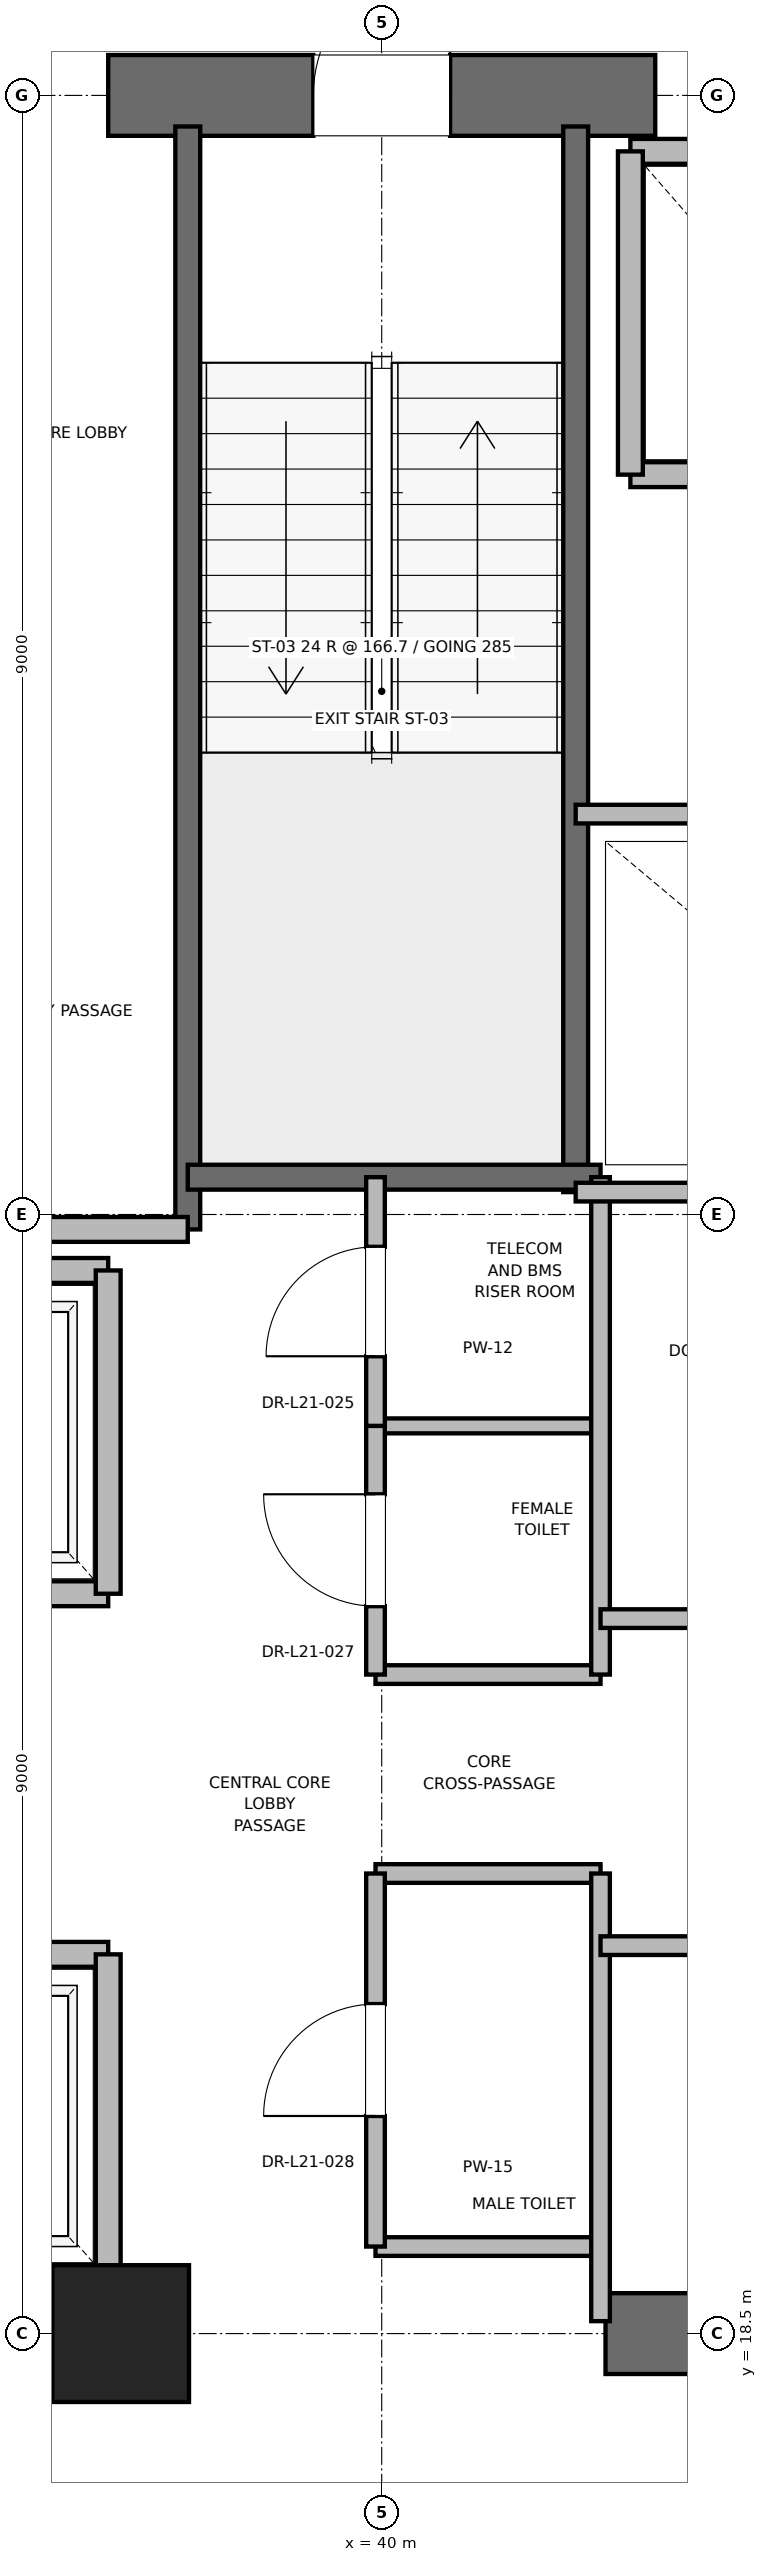
"""IFC4 building model, lengths in metres.
Left out: names, types, materials, properties, quantities, classifications, styles, units other than length and angle.
Written with IfcOpenShell. Run it as: python <this file> out.ifc"""

import sys

from ifc_helpers import new_model, si_unit, direction, frame, frame_2d, origin, origin_2d, place, context, subcontext, project, spatial, rectangle, extrude, element, fill, save


model = new_model("IFC4")
c1 = context("Model", 3, precision=1e-05, world=origin(), true_north=direction((0.0, 1.0)))
c2 = subcontext(c1, "Body", "Model", "MODEL_VIEW")
j1 = project(units=[si_unit("LENGTHUNIT", "METRE"), si_unit("PLANEANGLEUNIT", "RADIAN")], contexts=[c1])
p1 = place(None, origin())
s1 = spatial("IfcSite", under=j1, at=p1, CompositionType="ELEMENT")
p2 = place(p1, origin())
s2 = spatial("IfcBuilding", under=s1, at=p2, CompositionType="ELEMENT")
p3 = place(p2, frame((0.0, 0.0, 91.6)))
s3 = spatial("IfcBuildingStorey", under=s2, at=p3, CompositionType="ELEMENT", Elevation=91.6)
p4 = place(p3, frame((37.9, 18.5, 0.0), z_axis=(0.0, 0.0, 1.0), x_axis=(1.0, 0.0, 0.0)))
e1 = element("IfcColumn", 1, at=p4, inside=s3, PredefinedType="PILASTER", context=c2, shape_type="SweptSolid", body=[
    extrude(rectangle(XDim=1.1, YDim=1.1, at=origin_2d()), origin(), (0.0, 0.0, 1.0), 4.0),
])
for number, where, z_axis, x_axis in (
    (2, (29.0, 18.5, 0.0), (0.0, 0.0, 1.0), (1.0, 0.0, 0.0)),
    (3, (41.8, 18.5, 0.0), (0.0, 0.0, 1.0), (1.0, 0.0, 0.0)),
):
    element("IfcWall", number, at=place(p3, frame(where, z_axis=z_axis, x_axis=x_axis)), inside=s3, PredefinedType="SHEAR", context=c2, shape_type="SweptSolid", body=[
        extrude(rectangle(XDim=9.2, YDim=0.65, at=frame_2d((4.6, 0.0))), origin(), (0.0, 0.0, 1.0), 3.76),
    ])
p5 = place(p3, frame((37.8, 36.5, 0.0), z_axis=(0.0, 0.0, 1.0), x_axis=(1.0, 0.0, 0.0)))
e4 = element("IfcWall", 4, at=p5, inside=s3, PredefinedType="SHEAR", context=c2, shape_type="SweptSolid", body=[
    extrude(rectangle(XDim=4.4, YDim=0.65, at=frame_2d((2.2, 0.0))), origin(), (0.0, 0.0, 1.0), 3.76),
])
p6 = place(p5, frame((1.65, 0.0, 0.0)))
e5 = element("IfcOpeningElement", 5, at=p6, cuts=e4, PredefinedType="OPENING", context=c2, shape_type="SweptSolid", body=[
    extrude(rectangle(XDim=1.1, YDim=2.15, at=frame_2d((0.55, 1.075))), frame((0.0, 0.325, 0.0), z_axis=(0.0, -1.0, 0.0), x_axis=(1.0, 0.0, 0.0)), (0.0, 0.0, 1.0), 0.65),
])
p7 = place(p3, frame((38.44, 27.38, 0.0), z_axis=(0.0, 0.0, 1.0), x_axis=(0.0, 1.0, 0.0)))
e6 = element("IfcWall", 6, at=p7, inside=s3, PredefinedType="SOLIDWALL", context=c2, shape_type="SweptSolid", body=[
    extrude(rectangle(XDim=8.87, YDim=0.2, at=frame_2d((4.435, 0.0))), origin(), (0.0, 0.0, 1.0), 3.76),
])
p8 = place(p3, frame((41.56, 27.68, 0.0), z_axis=(0.0, 0.0, 1.0), x_axis=(0.0, 1.0, 0.0)))
e7 = element("IfcWall", 7, at=p8, inside=s3, PredefinedType="SOLIDWALL", context=c2, shape_type="SweptSolid", body=[
    extrude(rectangle(XDim=8.57, YDim=0.2, at=frame_2d((4.285, 0.0))), origin(), (0.0, 0.0, 1.0), 3.76),
])
p9 = place(p3, frame((38.44, 27.8, 0.0), z_axis=(0.0, 0.0, 1.0), x_axis=(1.0, 0.0, 0.0)))
e8 = element("IfcWall", 8, at=p9, inside=s3, PredefinedType="SOLIDWALL", context=c2, shape_type="SweptSolid", body=[
    extrude(rectangle(XDim=3.32, YDim=0.2, at=frame_2d((1.66, 0.0))), origin(), (0.0, 0.0, 1.0), 3.76),
])
p10 = place(p3, frame((32.82, 27.38, 0.0), z_axis=(0.0, 0.0, 1.0), x_axis=(1.0, 0.0, 0.0)))
e9 = element("IfcWall", 9, at=p10, inside=s3, PredefinedType="PARTITIONING", context=c2, shape_type="SweptSolid", body=[
    extrude(rectangle(XDim=5.62, YDim=0.2, at=frame_2d((2.81, 0.0))), origin(), (0.0, 0.0, 1.0), 3.76),
])
p11 = place(p3, frame((35.5, 18.95, 0.0), z_axis=(0.0, 0.0, 1.0), x_axis=(1.0, 0.0, 0.0)))
e10 = element("IfcWall", 10, at=p11, inside=s3, PredefinedType="SOLIDWALL", context=c2, shape_type="SweptSolid", body=[
    extrude(rectangle(XDim=2.3, YDim=0.2, at=frame_2d((1.15, 0.0))), origin(), (0.0, 0.0, 1.0), 2.54),
])
p12 = place(p3, frame((37.8, 21.55, 0.0), z_axis=(0.0, 0.0, 1.0), x_axis=(-1.0, 0.0, 0.0)))
e11 = element("IfcWall", 11, at=p12, inside=s3, PredefinedType="SOLIDWALL", context=c2, shape_type="SweptSolid", body=[
    extrude(rectangle(XDim=2.3, YDim=0.2, at=frame_2d((1.15, 0.0))), origin(), (0.0, 0.0, 1.0), 3.76),
])
p13 = place(p12, frame((0.6, 0.0, 0.0)))
e12 = element("IfcOpeningElement", 12, at=p13, cuts=e11, PredefinedType="OPENING", context=c2, shape_type="SweptSolid", body=[
    extrude(rectangle(XDim=1.1, YDim=2.2, at=frame_2d((0.55, 1.1))), frame((0.0, 0.1, 0.0), z_axis=(0.0, -1.0, 0.0), x_axis=(1.0, 0.0, 0.0)), (0.0, 0.0, 1.0), 0.2),
])
p14 = place(p3, frame((37.8, 18.95, 0.0), z_axis=(0.0, 0.0, 1.0), x_axis=(0.0, 1.0, 0.0)))
e13 = element("IfcWall", 13, at=p14, inside=s3, PredefinedType="SOLIDWALL", context=c2, shape_type="SweptSolid", body=[
    extrude(rectangle(XDim=2.6, YDim=0.2, at=frame_2d((1.3, 0.0))), origin(), (0.0, 0.0, 1.0), 2.54),
])
p15 = place(p3, frame((35.5, 24.45, 0.0), z_axis=(0.0, 0.0, 1.0), x_axis=(1.0, 0.0, 0.0)))
e14 = element("IfcWall", 14, at=p15, inside=s3, PredefinedType="SOLIDWALL", context=c2, shape_type="SweptSolid", body=[
    extrude(rectangle(XDim=2.3, YDim=0.2, at=frame_2d((1.15, 0.0))), origin(), (0.0, 0.0, 1.0), 3.76),
])
p16 = place(p15, frame((0.6, 0.0, 0.0)))
e15 = element("IfcOpeningElement", 15, at=p16, cuts=e14, PredefinedType="OPENING", context=c2, shape_type="SweptSolid", body=[
    extrude(rectangle(XDim=1.1, YDim=2.2, at=frame_2d((0.55, 1.1))), frame((0.0, 0.1, 0.0), z_axis=(0.0, -1.0, 0.0), x_axis=(1.0, 0.0, 0.0)), (0.0, 0.0, 1.0), 0.2),
])
p17 = place(p3, frame((37.8, 27.05, 0.0), z_axis=(0.0, 0.0, 1.0), x_axis=(-1.0, 0.0, 0.0)))
e16 = element("IfcWall", 16, at=p17, inside=s3, PredefinedType="SOLIDWALL", context=c2, shape_type="SweptSolid", body=[
    extrude(rectangle(XDim=2.3, YDim=0.2, at=frame_2d((1.15, 0.0))), origin(), (0.0, 0.0, 1.0), 3.76),
])
p18 = place(p3, frame((37.8, 24.45, 0.0), z_axis=(0.0, 0.0, 1.0), x_axis=(0.0, 1.0, 0.0)))
e17 = element("IfcWall", 17, at=p18, inside=s3, PredefinedType="SOLIDWALL", context=c2, shape_type="SweptSolid", body=[
    extrude(rectangle(XDim=2.6, YDim=0.2, at=frame_2d((1.3, 0.0))), origin(), (0.0, 0.0, 1.0), 3.76),
])
p19 = place(p3, frame((42.0, 33.45, 0.0), z_axis=(0.0, 0.0, 1.0), x_axis=(1.0, 0.0, 0.0)))
e18 = element("IfcWall", 18, at=p19, inside=s3, PredefinedType="SOLIDWALL", context=c2, shape_type="SweptSolid", body=[
    extrude(rectangle(XDim=2.3, YDim=0.2, at=frame_2d((1.15, 0.0))), origin(), (0.0, 0.0, 1.0), 3.76),
])
p20 = place(p3, frame((44.3, 36.05, 0.0), z_axis=(0.0, 0.0, 1.0), x_axis=(-1.0, 0.0, 0.0)))
e19 = element("IfcWall", 19, at=p20, inside=s3, PredefinedType="SOLIDWALL", context=c2, shape_type="SweptSolid", body=[
    extrude(rectangle(XDim=2.3, YDim=0.2, at=frame_2d((1.15, 0.0))), origin(), (0.0, 0.0, 1.0), 2.54),
])
p21 = place(p3, frame((42.0, 36.05, 0.0), z_axis=(0.0, 0.0, 1.0), x_axis=(0.0, -1.0, 0.0)))
e20 = element("IfcWall", 20, at=p21, inside=s3, PredefinedType="SOLIDWALL", context=c2, shape_type="SweptSolid", body=[
    extrude(rectangle(XDim=2.6, YDim=0.2, at=frame_2d((1.3, 0.0))), origin(), (0.0, 0.0, 1.0), 2.54),
])
for number, where, z_axis, x_axis in (
    (21, (39.95, 19.2, 0.0), (0.0, 0.0, 1.0), (1.0, 0.0, 0.0)),
    (22, (39.95, 22.2, 0.0), (0.0, 0.0, 1.0), (1.0, 0.0, 0.0)),
    (23, (39.95, 23.8, 0.0), (0.0, 0.0, 1.0), (1.0, 0.0, 0.0)),
):
    element("IfcWall", number, at=place(p3, frame(where, z_axis=z_axis, x_axis=x_axis)), inside=s3, PredefinedType="PARTITIONING", context=c2, shape_type="SweptSolid", body=[
        extrude(rectangle(XDim=1.81, YDim=0.15, at=frame_2d((0.905, 0.0))), origin(), (0.0, 0.0, 1.0), 2.85),
    ])
p22 = place(p3, frame((39.95, 25.8, 0.0), z_axis=(0.0, 0.0, 1.0), x_axis=(1.0, 0.0, 0.0)))
e24 = element("IfcWall", 24, at=p22, inside=s3, PredefinedType="PARTITIONING", context=c2, shape_type="SweptSolid", body=[
    extrude(rectangle(XDim=1.81, YDim=0.12, at=frame_2d((0.905, 0.0))), origin(), (0.0, 0.0, 1.0), 2.85),
])
p23 = place(p3, frame((41.76, 18.6, 0.0), z_axis=(0.0, 0.0, 1.0), x_axis=(0.0, 1.0, 0.0)))
e25 = element("IfcWall", 25, at=p23, inside=s3, PredefinedType="PARTITIONING", context=c2, shape_type="SweptSolid", body=[
    extrude(rectangle(XDim=3.6, YDim=0.15, at=frame_2d((1.8, 0.0))), origin(), (0.0, 0.0, 1.0), 2.54),
])
p24 = place(p3, frame((41.76, 23.8, 0.0), z_axis=(0.0, 0.0, 1.0), x_axis=(0.0, 1.0, 0.0)))
e26 = element("IfcWall", 26, at=p24, inside=s3, PredefinedType="PARTITIONING", context=c2, shape_type="SweptSolid", body=[
    extrude(rectangle(XDim=4.0, YDim=0.15, at=frame_2d((2.0, 0.0))), origin(), (0.0, 0.0, 1.0), 2.85),
])
p25 = place(p3, frame((39.95, 19.2, 0.0), z_axis=(0.0, 0.0, 1.0), x_axis=(0.0, 1.0, 0.0)))
e27 = element("IfcWall", 27, at=p25, inside=s3, PredefinedType="PARTITIONING", context=c2, shape_type="SweptSolid", body=[
    extrude(rectangle(XDim=3.0, YDim=0.15, at=frame_2d((1.5, 0.0))), origin(), (0.0, 0.0, 1.0), 2.85),
])
p26 = place(p25, frame((1.05, 0.0, 0.0)))
e28 = element("IfcOpeningElement", 28, at=p26, cuts=e27, PredefinedType="OPENING", context=c2, shape_type="SweptSolid", body=[
    extrude(rectangle(XDim=0.9, YDim=2.1, at=frame_2d((0.45, 1.05))), frame((0.0, 0.075, 0.0), z_axis=(0.0, -1.0, 0.0), x_axis=(1.0, 0.0, 0.0)), (0.0, 0.0, 1.0), 0.15),
])
p27 = place(p3, frame((39.95, 23.8, 0.0), z_axis=(0.0, 0.0, 1.0), x_axis=(0.0, 1.0, 0.0)))
e29 = element("IfcWall", 29, at=p27, inside=s3, PredefinedType="PARTITIONING", context=c2, shape_type="SweptSolid", body=[
    extrude(rectangle(XDim=2.0, YDim=0.15, at=frame_2d((1.0, 0.0))), origin(), (0.0, 0.0, 1.0), 2.85),
])
p28 = place(p27, frame((0.55, 0.0, 0.0)))
e30 = element("IfcOpeningElement", 30, at=p28, cuts=e29, PredefinedType="OPENING", context=c2, shape_type="SweptSolid", body=[
    extrude(rectangle(XDim=0.9, YDim=2.1, at=frame_2d((0.45, 1.05))), frame((0.0, 0.075, 0.0), z_axis=(0.0, -1.0, 0.0), x_axis=(1.0, 0.0, 0.0)), (0.0, 0.0, 1.0), 0.15),
])
p29 = place(p3, frame((39.95, 25.8, 0.0), z_axis=(0.0, 0.0, 1.0), x_axis=(0.0, 1.0, 0.0)))
e31 = element("IfcWall", 31, at=p29, inside=s3, PredefinedType="PARTITIONING", context=c2, shape_type="SweptSolid", body=[
    extrude(rectangle(XDim=2.0, YDim=0.15, at=frame_2d((1.0, 0.0))), origin(), (0.0, 0.0, 1.0), 2.85),
])
p30 = place(p29, frame((0.56, 0.0, 0.0)))
e32 = element("IfcOpeningElement", 32, at=p30, cuts=e31, PredefinedType="OPENING", context=c2, shape_type="SweptSolid", body=[
    extrude(rectangle(XDim=0.88, YDim=2.1, at=frame_2d((0.44, 1.05))), frame((0.0, 0.075, 0.0), z_axis=(0.0, -1.0, 0.0), x_axis=(1.0, 0.0, 0.0)), (0.0, 0.0, 1.0), 0.15),
])
p31 = place(p3, frame((41.56, 27.68, 0.0), z_axis=(0.0, 0.0, 1.0), x_axis=(1.0, 0.0, 0.0)))
e33 = element("IfcWall", 33, at=p31, inside=s3, PredefinedType="PARTITIONING", context=c2, shape_type="SweptSolid", body=[
    extrude(rectangle(XDim=3.59, YDim=0.15, at=frame_2d((1.795, 0.0))), origin(), (0.0, 0.0, 1.0), 2.85),
])
p32 = place(p3, frame((41.76, 21.62, 0.0), z_axis=(0.0, 0.0, 1.0), x_axis=(1.0, 0.0, 0.0)))
e34 = element("IfcWall", 34, at=p32, inside=s3, PredefinedType="PARTITIONING", context=c2, shape_type="SweptSolid", body=[
    extrude(rectangle(XDim=5.98, YDim=0.15, at=frame_2d((2.99, 0.0))), origin(), (0.0, 0.0, 1.0), 2.85),
])
p33 = place(p32, frame((2.49, 0.0, 0.0)))
e35 = element("IfcOpeningElement", 35, at=p33, cuts=e34, PredefinedType="OPENING", context=c2, shape_type="SweptSolid", body=[
    extrude(rectangle(XDim=1.0, YDim=2.15, at=frame_2d((0.5, 1.075))), frame((0.0, 0.075, 0.0), z_axis=(0.0, -1.0, 0.0), x_axis=(1.0, 0.0, 0.0)), (0.0, 0.0, 1.0), 0.15),
])
p34 = place(p3, frame((41.76, 24.25, 0.0), z_axis=(0.0, 0.0, 1.0), x_axis=(1.0, 0.0, 0.0)))
e36 = element("IfcWall", 36, at=p34, inside=s3, PredefinedType="PARTITIONING", context=c2, shape_type="SweptSolid", body=[
    extrude(rectangle(XDim=3.39, YDim=0.15, at=frame_2d((1.695, 0.0))), origin(), (0.0, 0.0, 1.0), 2.85),
])
p35 = place(p34, frame((1.195, 0.0, 0.0)))
e37 = element("IfcOpeningElement", 37, at=p35, cuts=e36, PredefinedType="OPENING", context=c2, shape_type="SweptSolid", body=[
    extrude(rectangle(XDim=1.0, YDim=2.15, at=frame_2d((0.5, 1.075))), frame((0.0, 0.075, 0.0), z_axis=(0.0, -1.0, 0.0), x_axis=(1.0, 0.0, 0.0)), (0.0, 0.0, 1.0), 0.15),
])
p36 = place(p3, frame((41.56, 30.72, 0.0), z_axis=(0.0, 0.0, 1.0), x_axis=(1.0, 0.0, 0.0)))
e38 = element("IfcWall", 38, at=p36, inside=s3, PredefinedType="PARTITIONING", context=c2, shape_type="SweptSolid", body=[
    extrude(rectangle(XDim=3.59, YDim=0.15, at=frame_2d((1.795, 0.0))), origin(), (0.0, 0.0, 1.0), 2.85),
])
p37 = place(p36, frame((1.355, 0.0, 0.0)))
e39 = element("IfcOpeningElement", 39, at=p37, cuts=e38, PredefinedType="OPENING", context=c2, shape_type="SweptSolid", body=[
    extrude(rectangle(XDim=0.88, YDim=2.1, at=frame_2d((0.44, 1.05))), frame((0.0, 0.075, 0.0), z_axis=(0.0, -1.0, 0.0), x_axis=(1.0, 0.0, 0.0)), (0.0, 0.0, 1.0), 0.15),
])
p38 = place(p6, origin())
e40 = element("IfcDoor", 40, at=p38, inside=s3, OperationType="SINGLE_SWING_RIGHT", PredefinedType="DOOR", context=c2, shape_type="SweptSolid", body=[
    extrude(rectangle(XDim=1.1, YDim=2.15, at=frame_2d((0.55, 1.075))), frame((0.0, 0.025, 0.0), z_axis=(0.0, -1.0, 0.0), x_axis=(1.0, 0.0, 0.0)), (0.0, 0.0, 1.0), 0.05),
])
fill(e5, e40)
p39 = place(p26, origin())
e41 = element("IfcDoor", 41, at=p39, inside=s3, OperationType="SINGLE_SWING_LEFT", PredefinedType="DOOR", context=c2, shape_type="SweptSolid", body=[
    extrude(rectangle(XDim=0.9, YDim=2.1, at=frame_2d((0.45, 1.05))), frame((0.0, 0.025, 0.0), z_axis=(0.0, -1.0, 0.0), x_axis=(1.0, 0.0, 0.0)), (0.0, 0.0, 1.0), 0.05),
])
fill(e28, e41)
p40 = place(p28, origin())
e42 = element("IfcDoor", 42, at=p40, inside=s3, OperationType="SINGLE_SWING_RIGHT", PredefinedType="DOOR", context=c2, shape_type="SweptSolid", body=[
    extrude(rectangle(XDim=0.9, YDim=2.1, at=frame_2d((0.45, 1.05))), frame((0.0, 0.025, 0.0), z_axis=(0.0, -1.0, 0.0), x_axis=(1.0, 0.0, 0.0)), (0.0, 0.0, 1.0), 0.05),
])
fill(e30, e42)
p41 = place(p30, origin())
e43 = element("IfcDoor", 43, at=p41, inside=s3, OperationType="SINGLE_SWING_LEFT", PredefinedType="DOOR", context=c2, shape_type="SweptSolid", body=[
    extrude(rectangle(XDim=0.88, YDim=2.1, at=frame_2d((0.44, 1.05))), frame((0.0, 0.025, 0.0), z_axis=(0.0, -1.0, 0.0), x_axis=(1.0, 0.0, 0.0)), (0.0, 0.0, 1.0), 0.05),
])
fill(e32, e43)
save(model, sys.argv[1])
